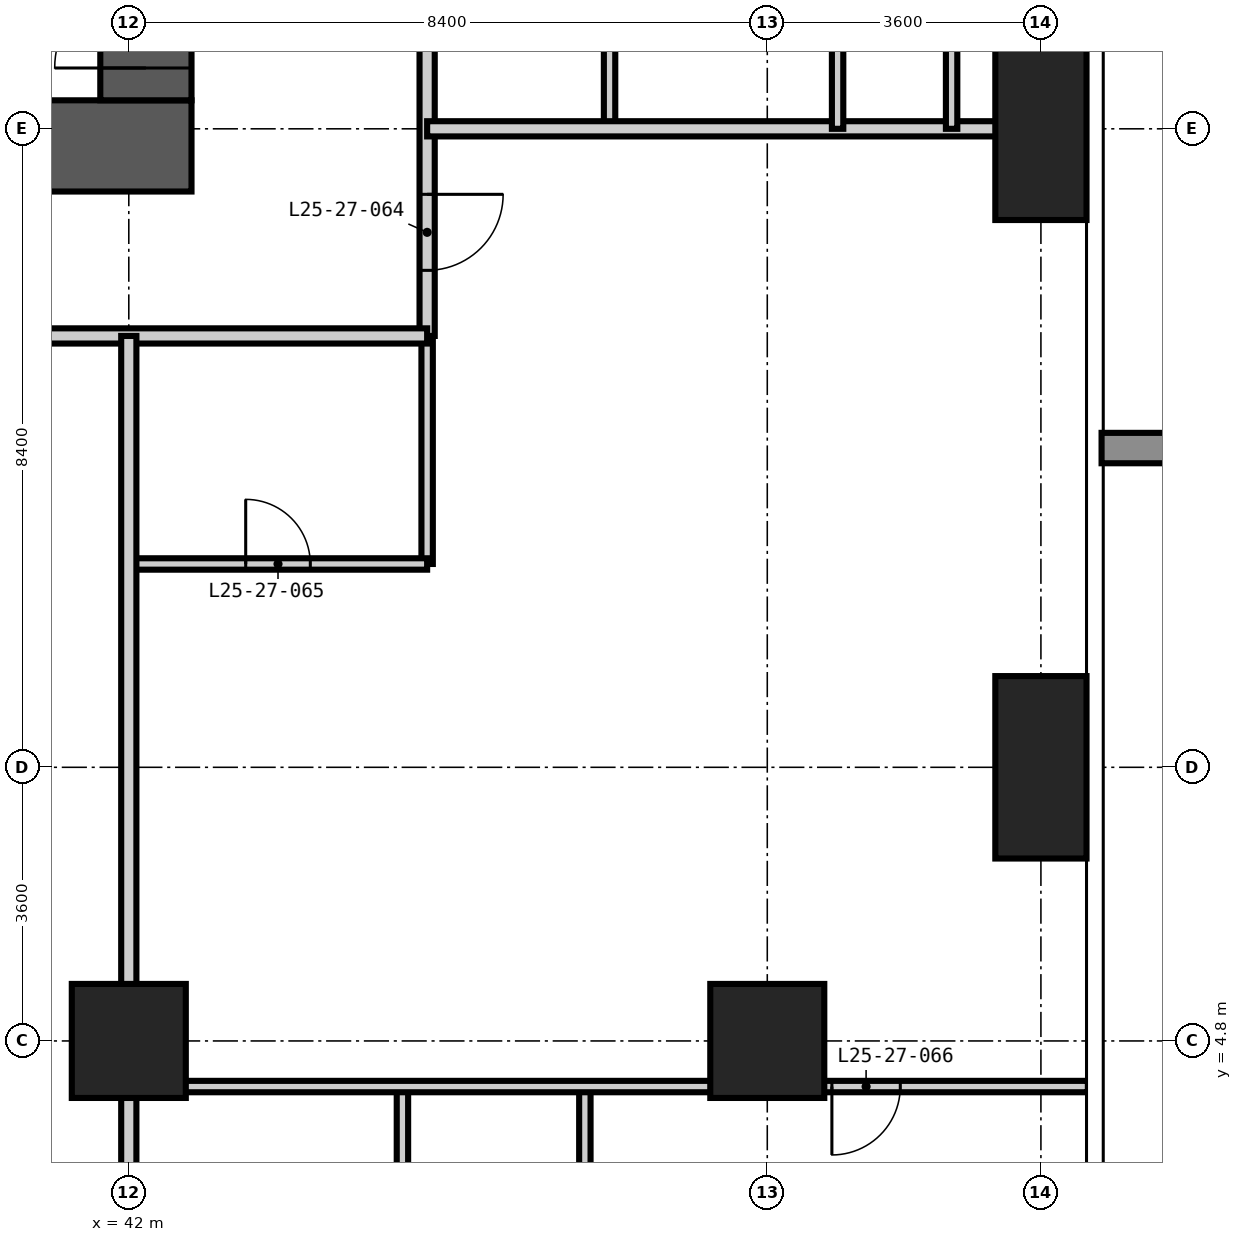
"""IFC4 building model, lengths in metres.
Left out: names, types, materials, properties, quantities, classifications, styles, units other than length and angle.
Written with IfcOpenShell. Run it as: python <this file> out.ifc"""

import sys

from ifc_helpers import new_model, si_unit, direction, frame, frame_2d, origin, origin_2d, place, context, subcontext, project, spatial, rectangle, extrude, element, fill, save


model = new_model("IFC4")
c1 = context("Model", 3, precision=1e-05, world=origin(), true_north=direction((0.0, 1.0)))
c2 = subcontext(c1, "Body", "Model", "MODEL_VIEW")
j1 = project(units=[si_unit("LENGTHUNIT", "METRE"), si_unit("PLANEANGLEUNIT", "RADIAN")], contexts=[c1])
p1 = place(None, origin())
s1 = spatial("IfcSite", under=j1, at=p1, CompositionType="ELEMENT")
p2 = place(p1, origin())
s2 = spatial("IfcBuilding", under=s1, at=p2, CompositionType="ELEMENT")
p3 = place(p2, frame((0.0, 0.0, 100.8)))
s3 = spatial("IfcBuildingStorey", under=s2, at=p3, CompositionType="ELEMENT", Elevation=100.8)
for number, where, z_axis, x_axis in (
    (1, (42.0, 4.8, -0.35), (0.0, 0.0, 1.0), (1.0, 0.0, 0.0)),
    (2, (50.4, 4.8, -0.35), (0.0, 0.0, 1.0), (1.0, 0.0, 0.0)),
):
    element("IfcColumn", number, at=place(p3, frame(where, z_axis=z_axis, x_axis=x_axis)), inside=s3, PredefinedType="COLUMN", context=c2, shape_type="SweptSolid", body=[
        extrude(rectangle(XDim=1.5, YDim=1.5, at=origin_2d()), origin(), (0.0, 0.0, 1.0), 3.6),
    ])
for number, where, z_axis, x_axis in (
    (3, (54.0, 8.4, -0.35), (0.0, 0.0, 1.0), (1.0, 0.0, 0.0)),
    (4, (54.0, 16.8, -0.35), (0.0, 0.0, 1.0), (1.0, 0.0, 0.0)),
):
    element("IfcColumn", number, at=place(p3, frame(where, z_axis=z_axis, x_axis=x_axis)), inside=s3, PredefinedType="COLUMN", context=c2, shape_type="SweptSolid", body=[
        extrude(rectangle(XDim=1.2, YDim=2.4, at=origin_2d()), origin(), (0.0, 0.0, 1.0), 3.6),
    ])
p4 = place(p3, frame((15.975, 16.575, -0.35), z_axis=(0.0, 0.0, 1.0), x_axis=(1.0, 0.0, 0.0)))
e5 = element("IfcWall", 5, at=p4, inside=s3, PredefinedType="SHEAR", context=c2, shape_type="SweptSolid", body=[
    extrude(rectangle(XDim=26.85, YDim=1.2, at=frame_2d((13.425, 0.0))), origin(), (0.0, 0.0, 1.0), 3.6),
])
p5 = place(p4, frame((12.925, 0.0, 0.35)))
e6 = element("IfcOpeningElement", 6, at=p5, cuts=e5, PredefinedType="OPENING", context=c2, shape_type="SweptSolid", body=[
    extrude(rectangle(XDim=1.0, YDim=2.1, at=frame_2d((0.5, 1.05))), frame((0.0, 0.61, 0.0), z_axis=(0.0, -1.0, 0.0), x_axis=(1.0, 0.0, 0.0)), (0.0, 0.0, 1.0), 1.22),
])
p6 = place(p4, frame((19.225, 0.0, 0.35)))
e7 = element("IfcOpeningElement", 7, at=p6, cuts=e5, PredefinedType="OPENING", context=c2, shape_type="SweptSolid", body=[
    extrude(rectangle(XDim=1.0, YDim=2.1, at=frame_2d((0.5, 1.05))), frame((0.0, 0.61, 0.0), z_axis=(0.0, -1.0, 0.0), x_axis=(1.0, 0.0, 0.0)), (0.0, 0.0, 1.0), 1.22),
])
p7 = place(p3, frame((42.225, 17.175, -0.35), z_axis=(0.0, 0.0, 1.0), x_axis=(0.0, 1.0, 0.0)))
e8 = element("IfcWall", 8, at=p7, inside=s3, PredefinedType="SHEAR", context=c2, shape_type="SweptSolid", body=[
    extrude(rectangle(XDim=24.45, YDim=1.2, at=frame_2d((12.225, 0.0))), origin(), (0.0, 0.0, 1.0), 3.6),
])
p8 = place(p7, frame((0.425, 0.0, 0.35)))
e9 = element("IfcOpeningElement", 9, at=p8, cuts=e8, PredefinedType="OPENING", context=c2, shape_type="SweptSolid", body=[
    extrude(rectangle(XDim=1.2, YDim=2.2, at=frame_2d((0.6, 1.1))), frame((0.0, 0.61, 0.0), z_axis=(0.0, -1.0, 0.0), x_axis=(1.0, 0.0, 0.0)), (0.0, 0.0, 1.0), 1.22),
])
p9 = place(p7, frame((11.325, 0.0, 0.35)))
e10 = element("IfcOpeningElement", 10, at=p9, cuts=e8, PredefinedType="OPENING", context=c2, shape_type="SweptSolid", body=[
    extrude(rectangle(XDim=1.8, YDim=2.2, at=frame_2d((0.9, 1.1))), frame((0.0, 0.61, 0.0), z_axis=(0.0, -1.0, 0.0), x_axis=(1.0, 0.0, 0.0)), (0.0, 0.0, 1.0), 1.22),
])
p10 = place(p7, frame((20.125, 0.0, 0.35)))
e11 = element("IfcOpeningElement", 11, at=p10, cuts=e8, PredefinedType="OPENING", context=c2, shape_type="SweptSolid", body=[
    extrude(rectangle(XDim=1.0, YDim=2.1, at=frame_2d((0.5, 1.05))), frame((0.0, 0.61, 0.0), z_axis=(0.0, -1.0, 0.0), x_axis=(1.0, 0.0, 0.0)), (0.0, 0.0, 1.0), 1.22),
])
for number, where, z_axis, x_axis in (
    (12, (45.925, 11.075, 0.0), (0.0, 0.0, 1.0), (0.0, 1.0, 0.0)),
    (13, (48.325, 16.8, 0.0), (0.0, 0.0, 1.0), (0.0, 1.0, 0.0)),
):
    element("IfcWall", number, at=place(p3, frame(where, z_axis=z_axis, x_axis=x_axis)), inside=s3, PredefinedType="PARTITIONING", context=c2, shape_type="SweptSolid", body=[
        extrude(rectangle(XDim=3.0, YDim=0.15, at=frame_2d((1.5, 0.0))), origin(), (0.0, 0.0, 1.0), 3.25),
    ])
p11 = place(p3, frame((42.0, 11.075, 0.0), z_axis=(0.0, 0.0, 1.0), x_axis=(1.0, 0.0, 0.0)))
e14 = element("IfcWall", 14, at=p11, inside=s3, PredefinedType="PARTITIONING", context=c2, shape_type="SweptSolid", body=[
    extrude(rectangle(XDim=3.925, YDim=0.15, at=frame_2d((1.962, 0.0))), origin(), (0.0, 0.0, 1.0), 3.25),
])
p12 = place(p11, frame((1.538, 0.0, 0.0)))
e15 = element("IfcOpeningElement", 15, at=p12, cuts=e14, PredefinedType="OPENING", context=c2, shape_type="SweptSolid", body=[
    extrude(rectangle(XDim=0.85, YDim=2.1, at=frame_2d((0.425, 1.05))), frame((0.0, 0.085, 0.0), z_axis=(0.0, -1.0, 0.0), x_axis=(1.0, 0.0, 0.0)), (0.0, 0.0, 1.0), 0.17),
])
p13 = place(p3, frame((45.925, 45.325, 0.0), z_axis=(0.0, 0.0, 1.0), x_axis=(0.0, -1.0, 0.0)))
e16 = element("IfcWall", 16, at=p13, inside=s3, PredefinedType="PARTITIONING", context=c2, shape_type="SweptSolid", body=[
    extrude(rectangle(XDim=31.25, YDim=0.2, at=frame_2d((15.625, 0.0))), origin(), (0.0, 0.0, 1.0), 3.25),
])
p14 = place(p13, frame((25.925, 0.0, 0.0)))
e17 = element("IfcOpeningElement", 17, at=p14, cuts=e16, PredefinedType="OPENING", context=c2, shape_type="SweptSolid", body=[
    extrude(rectangle(XDim=1.0, YDim=2.2, at=frame_2d((0.5, 1.1))), frame((0.0, 0.11, 0.0), z_axis=(0.0, -1.0, 0.0), x_axis=(1.0, 0.0, 0.0)), (0.0, 0.0, 1.0), 0.22),
])
p15 = place(p13, frame((19.625, 0.0, 0.0)))
e18 = element("IfcOpeningElement", 18, at=p15, cuts=e16, PredefinedType="OPENING", context=c2, shape_type="SweptSolid", body=[
    extrude(rectangle(XDim=1.0, YDim=2.2, at=frame_2d((0.5, 1.1))), frame((0.0, 0.11, 0.0), z_axis=(0.0, -1.0, 0.0), x_axis=(1.0, 0.0, 0.0)), (0.0, 0.0, 1.0), 0.22),
])
p16 = place(p13, frame((11.225, 0.0, 0.0)))
e19 = element("IfcOpeningElement", 19, at=p16, cuts=e16, PredefinedType="OPENING", context=c2, shape_type="SweptSolid", body=[
    extrude(rectangle(XDim=1.0, YDim=2.2, at=frame_2d((0.5, 1.1))), frame((0.0, 0.11, 0.0), z_axis=(0.0, -1.0, 0.0), x_axis=(1.0, 0.0, 0.0)), (0.0, 0.0, 1.0), 0.22),
])
p17 = place(p13, frame((4.925, 0.0, 0.0)))
e20 = element("IfcOpeningElement", 20, at=p17, cuts=e16, PredefinedType="OPENING", context=c2, shape_type="SweptSolid", body=[
    extrude(rectangle(XDim=1.0, YDim=2.2, at=frame_2d((0.5, 1.1))), frame((0.0, 0.11, 0.0), z_axis=(0.0, -1.0, 0.0), x_axis=(1.0, 0.0, 0.0)), (0.0, 0.0, 1.0), 0.22),
])
p18 = place(p13, frame((29.387, 0.0, 0.0)))
e21 = element("IfcOpeningElement", 21, at=p18, cuts=e16, PredefinedType="OPENING", context=c2, shape_type="SweptSolid", body=[
    extrude(rectangle(XDim=1.0, YDim=2.2, at=frame_2d((0.5, 1.1))), frame((0.0, 0.11, 0.0), z_axis=(0.0, -1.0, 0.0), x_axis=(1.0, 0.0, 0.0)), (0.0, 0.0, 1.0), 0.22),
])
p19 = place(p13, frame((1.162, 0.0, 0.0)))
e22 = element("IfcOpeningElement", 22, at=p19, cuts=e16, PredefinedType="OPENING", context=c2, shape_type="SweptSolid", body=[
    extrude(rectangle(XDim=1.0, YDim=2.2, at=frame_2d((0.5, 1.1))), frame((0.0, 0.11, 0.0), z_axis=(0.0, -1.0, 0.0), x_axis=(1.0, 0.0, 0.0)), (0.0, 0.0, 1.0), 0.22),
])
p20 = place(p3, frame((45.925, 14.075, 0.0), z_axis=(0.0, 0.0, 1.0), x_axis=(-1.0, 0.0, 0.0)))
e23 = element("IfcWall", 23, at=p20, inside=s3, PredefinedType="PARTITIONING", context=c2, shape_type="SweptSolid", body=[
    extrude(rectangle(XDim=33.325, YDim=0.2, at=frame_2d((16.663, 0.0))), origin(), (0.0, 0.0, 1.0), 3.25),
])
p21 = place(p20, frame((26.525, 0.0, 0.0)))
e24 = element("IfcOpeningElement", 24, at=p21, cuts=e23, PredefinedType="OPENING", context=c2, shape_type="SweptSolid", body=[
    extrude(rectangle(XDim=1.0, YDim=2.2, at=frame_2d((0.5, 1.1))), frame((0.0, 0.11, 0.0), z_axis=(0.0, -1.0, 0.0), x_axis=(1.0, 0.0, 0.0)), (0.0, 0.0, 1.0), 0.22),
])
p22 = place(p20, frame((20.225, 0.0, 0.0)))
e25 = element("IfcOpeningElement", 25, at=p22, cuts=e23, PredefinedType="OPENING", context=c2, shape_type="SweptSolid", body=[
    extrude(rectangle(XDim=1.0, YDim=2.2, at=frame_2d((0.5, 1.1))), frame((0.0, 0.11, 0.0), z_axis=(0.0, -1.0, 0.0), x_axis=(1.0, 0.0, 0.0)), (0.0, 0.0, 1.0), 0.22),
])
p23 = place(p20, frame((11.825, 0.0, 0.0)))
e26 = element("IfcOpeningElement", 26, at=p23, cuts=e23, PredefinedType="OPENING", context=c2, shape_type="SweptSolid", body=[
    extrude(rectangle(XDim=1.0, YDim=2.2, at=frame_2d((0.5, 1.1))), frame((0.0, 0.11, 0.0), z_axis=(0.0, -1.0, 0.0), x_axis=(1.0, 0.0, 0.0)), (0.0, 0.0, 1.0), 0.22),
])
p24 = place(p20, frame((5.525, 0.0, 0.0)))
e27 = element("IfcOpeningElement", 27, at=p24, cuts=e23, PredefinedType="OPENING", context=c2, shape_type="SweptSolid", body=[
    extrude(rectangle(XDim=1.0, YDim=2.2, at=frame_2d((0.5, 1.1))), frame((0.0, 0.11, 0.0), z_axis=(0.0, -1.0, 0.0), x_axis=(1.0, 0.0, 0.0)), (0.0, 0.0, 1.0), 0.22),
])
p25 = place(p3, frame((42.0, -0.018, 0.0), z_axis=(0.0, 0.0, 1.0), x_axis=(0.0, 1.0, 0.0)))
e28 = element("IfcWall", 28, at=p25, inside=s3, PredefinedType="PARTITIONING", context=c2, shape_type="SweptSolid", body=[
    extrude(rectangle(XDim=14.093, YDim=0.2, at=frame_2d((7.046, 0.0))), origin(), (0.0, 0.0, 1.0), 3.25),
])
p26 = place(p3, frame((45.925, 16.8, 0.0), z_axis=(0.0, 0.0, 1.0), x_axis=(1.0, 0.0, 0.0)))
e29 = element("IfcWall", 29, at=p26, inside=s3, PredefinedType="PARTITIONING", context=c2, shape_type="SweptSolid", body=[
    extrude(rectangle(XDim=8.693, YDim=0.2, at=frame_2d((4.346, 0.0))), origin(), (0.0, 0.0, 1.0), 3.25),
])
p27 = place(p3, frame((45.6, 1.2, 0.0), z_axis=(0.0, 0.0, 1.0), x_axis=(0.0, 1.0, 0.0)))
e30 = element("IfcWall", 30, at=p27, inside=s3, PredefinedType="PARTITIONING", context=c2, shape_type="SweptSolid", body=[
    extrude(rectangle(XDim=3.0, YDim=0.15, at=frame_2d((1.5, 0.0))), origin(), (0.0, 0.0, 1.0), 3.25),
])
p28 = place(p3, frame((48.0, 1.2, 0.0), z_axis=(0.0, 0.0, 1.0), x_axis=(0.0, 1.0, 0.0)))
e31 = element("IfcWall", 31, at=p28, inside=s3, PredefinedType="PARTITIONING", context=c2, shape_type="SweptSolid", body=[
    extrude(rectangle(XDim=3.0, YDim=0.15, at=frame_2d((1.5, 0.0))), origin(), (0.0, 0.0, 1.0), 3.25),
])
p29 = place(p28, frame((1.05, 0.0, 0.0)))
e32 = element("IfcOpeningElement", 32, at=p29, cuts=e31, PredefinedType="OPENING", context=c2, shape_type="SweptSolid", body=[
    extrude(rectangle(XDim=0.9, YDim=2.1, at=frame_2d((0.45, 1.05))), frame((0.0, 0.085, 0.0), z_axis=(0.0, -1.0, 0.0), x_axis=(1.0, 0.0, 0.0)), (0.0, 0.0, 1.0), 0.17),
])
p30 = place(p3, frame((51.325, 16.8, 0.0), z_axis=(0.0, 0.0, 1.0), x_axis=(0.0, 1.0, 0.0)))
e33 = element("IfcWall", 33, at=p30, inside=s3, PredefinedType="PARTITIONING", context=c2, shape_type="SweptSolid", body=[
    extrude(rectangle(XDim=3.0, YDim=0.15, at=frame_2d((1.5, 0.0))), origin(), (0.0, 0.0, 1.0), 3.25),
])
p31 = place(p3, frame((52.825, 16.8, 0.0), z_axis=(0.0, 0.0, 1.0), x_axis=(0.0, 1.0, 0.0)))
e34 = element("IfcWall", 34, at=p31, inside=s3, PredefinedType="PARTITIONING", context=c2, shape_type="SweptSolid", body=[
    extrude(rectangle(XDim=3.0, YDim=0.15, at=frame_2d((1.5, 0.0))), origin(), (0.0, 0.0, 1.0), 3.25),
])
p32 = place(p31, frame((1.25, 0.0, 0.0)))
e35 = element("IfcOpeningElement", 35, at=p32, cuts=e34, PredefinedType="OPENING", context=c2, shape_type="SweptSolid", body=[
    extrude(rectangle(XDim=0.9, YDim=2.1, at=frame_2d((0.45, 1.05))), frame((0.0, 0.085, 0.0), z_axis=(0.0, -1.0, 0.0), x_axis=(1.0, 0.0, 0.0)), (0.0, 0.0, 1.0), 0.17),
])
p33 = place(p3, frame((42.0, 4.2, 0.0), z_axis=(0.0, 0.0, 1.0), x_axis=(1.0, 0.0, 0.0)))
e36 = element("IfcWall", 36, at=p33, inside=s3, PredefinedType="PARTITIONING", context=c2, shape_type="SweptSolid", body=[
    extrude(rectangle(XDim=12.618, YDim=0.15, at=frame_2d((6.309, 0.0))), origin(), (0.0, 0.0, 1.0), 3.25),
])
p34 = place(p33, frame((9.25, 0.0, 0.0)))
e37 = element("IfcOpeningElement", 37, at=p34, cuts=e36, PredefinedType="OPENING", context=c2, shape_type="SweptSolid", body=[
    extrude(rectangle(XDim=0.9, YDim=2.1, at=frame_2d((0.45, 1.05))), frame((0.0, 0.085, 0.0), z_axis=(0.0, -1.0, 0.0), x_axis=(1.0, 0.0, 0.0)), (0.0, 0.0, 1.0), 0.17),
])
p35 = place(p8, origin())
e38 = element("IfcDoor", 38, at=p35, inside=s3, OperationType="SINGLE_SWING_LEFT", PredefinedType="DOOR", context=c2, shape_type="SweptSolid", body=[
    extrude(rectangle(XDim=1.2, YDim=2.2, at=frame_2d((0.6, 1.1))), frame((0.0, 0.025, 0.0), z_axis=(0.0, -1.0, 0.0), x_axis=(1.0, 0.0, 0.0)), (0.0, 0.0, 1.0), 0.05),
])
fill(e9, e38)
p36 = place(p18, origin())
e39 = element("IfcDoor", 39, at=p36, inside=s3, OperationType="SINGLE_SWING_LEFT", PredefinedType="DOOR", context=c2, shape_type="SweptSolid", body=[
    extrude(rectangle(XDim=1.0, YDim=2.2, at=frame_2d((0.5, 1.1))), frame((0.0, 0.025, 0.0), z_axis=(0.0, -1.0, 0.0), x_axis=(1.0, 0.0, 0.0)), (0.0, 0.0, 1.0), 0.05),
])
fill(e21, e39)
p37 = place(p12, origin())
e40 = element("IfcDoor", 40, at=p37, inside=s3, OperationType="SINGLE_SWING_LEFT", PredefinedType="DOOR", context=c2, shape_type="SweptSolid", body=[
    extrude(rectangle(XDim=0.85, YDim=2.1, at=frame_2d((0.425, 1.05))), frame((0.0, 0.025, 0.0), z_axis=(0.0, -1.0, 0.0), x_axis=(1.0, 0.0, 0.0)), (0.0, 0.0, 1.0), 0.05),
])
fill(e15, e40)
p38 = place(p34, frame((0.9, 0.0, 0.0), z_axis=(0.0, 0.0, 1.0), x_axis=(-1.0, 0.0, 0.0)))
e41 = element("IfcDoor", 41, at=p38, inside=s3, OperationType="SINGLE_SWING_RIGHT", PredefinedType="DOOR", context=c2, shape_type="SweptSolid", body=[
    extrude(rectangle(XDim=0.9, YDim=2.1, at=frame_2d((0.45, 1.05))), frame((0.0, 0.025, 0.0), z_axis=(0.0, -1.0, 0.0), x_axis=(1.0, 0.0, 0.0)), (0.0, 0.0, 1.0), 0.05),
])
fill(e37, e41)
save(model, sys.argv[1])
